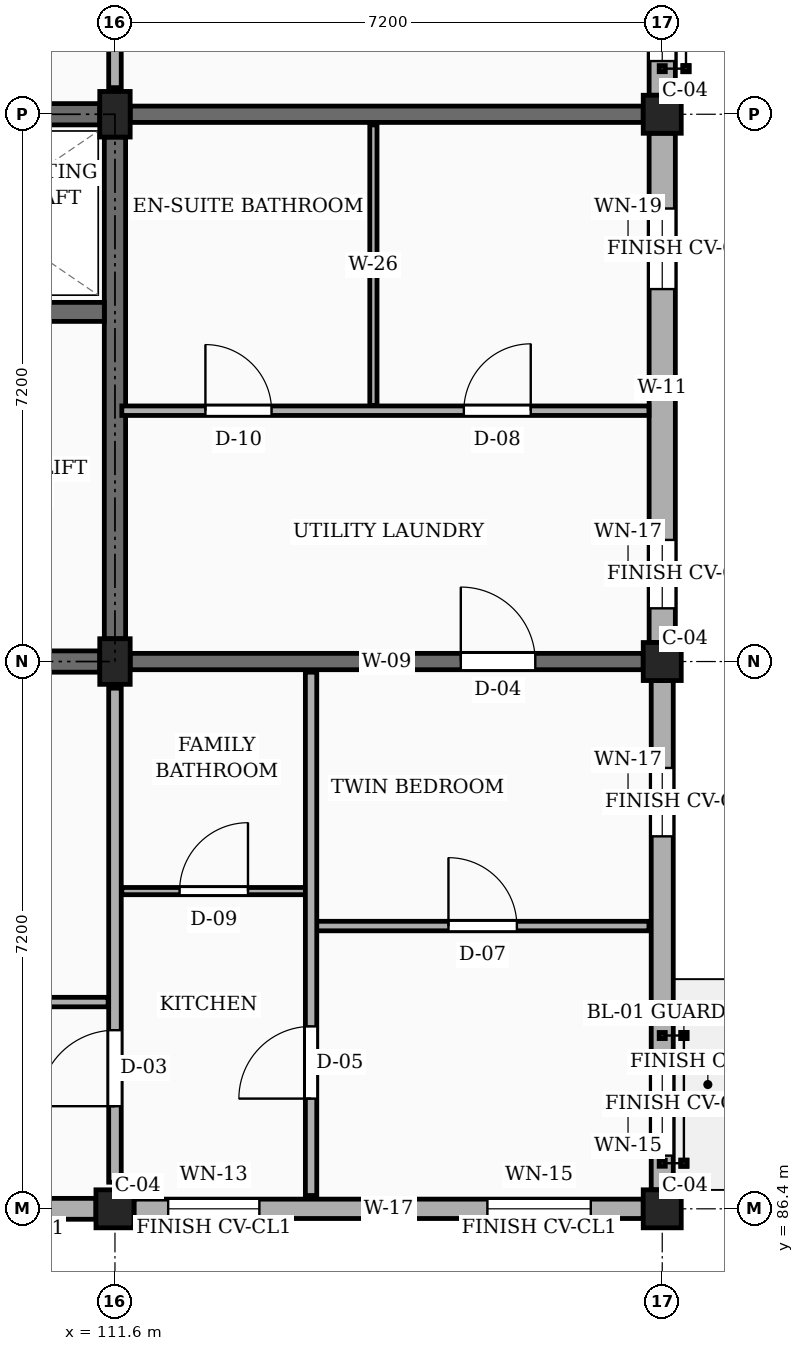
"""IFC4 building model, lengths in metres.
Left out: names, types, materials, properties, quantities, classifications, styles, units other than length and angle.
Written with IfcOpenShell. Run it as: python <this file> out.ifc"""

import sys

from ifc_helpers import new_model, si_unit, direction, frame, frame_2d, origin, origin_2d, place, context, subcontext, project, spatial, rectangle, extrude, element, fill, save


model = new_model("IFC4")
c1 = context("Model", 3, precision=1e-05, world=origin(), true_north=direction((0.0, 1.0)))
c2 = subcontext(c1, "Body", "Model", "MODEL_VIEW")
j1 = project(units=[si_unit("LENGTHUNIT", "METRE"), si_unit("PLANEANGLEUNIT", "RADIAN")], contexts=[c1])
p1 = place(None, origin())
s1 = spatial("IfcSite", under=j1, at=p1, CompositionType="ELEMENT")
p2 = place(p1, origin())
s2 = spatial("IfcBuilding", under=s1, at=p2, CompositionType="ELEMENT")
p3 = place(p2, frame((0.0, 0.0, 32.85)))
s3 = spatial("IfcBuildingStorey", under=s2, at=p3, CompositionType="ELEMENT", Elevation=32.85)
p4 = place(p3, frame((111.6, 86.4, 0.0), z_axis=(0.0, 0.0, 1.0), x_axis=(1.0, 0.0, 0.0)))
e1 = element("IfcColumn", 1, at=p4, inside=s3, PredefinedType="COLUMN", context=c2, shape_type="SweptSolid", body=[
    extrude(rectangle(XDim=0.5, YDim=0.5, at=origin_2d()), origin(), (0.0, 0.0, 1.0), 3.15),
])
for number, where, z_axis, x_axis in (
    (2, (111.6, 93.6, 0.0), (0.0, 0.0, 1.0), (1.0, 0.0, 0.0)),
    (3, (111.6, 100.8, 0.0), (0.0, 0.0, 1.0), (1.0, 0.0, 0.0)),
):
    element("IfcColumn", number, at=place(p3, frame(where, z_axis=z_axis, x_axis=x_axis)), inside=s3, PredefinedType="COLUMN", context=c2, shape_type="SweptSolid", body=[
        extrude(rectangle(XDim=0.4, YDim=0.6, at=origin_2d()), origin(), (0.0, 0.0, 1.0), 3.15),
    ])
for number, where, z_axis, x_axis in (
    (4, (118.8, 86.4, 0.0), (0.0, 0.0, 1.0), (1.0, 0.0, 0.0)),
    (5, (118.8, 93.6, 0.0), (0.0, 0.0, 1.0), (1.0, 0.0, 0.0)),
    (6, (118.8, 100.8, 0.0), (0.0, 0.0, 1.0), (1.0, 0.0, 0.0)),
):
    element("IfcColumn", number, at=place(p3, frame(where, z_axis=z_axis, x_axis=x_axis)), inside=s3, PredefinedType="COLUMN", context=c2, shape_type="SweptSolid", body=[
        extrude(rectangle(XDim=0.5, YDim=0.5, at=origin_2d()), origin(), (0.0, 0.0, 1.0), 3.15),
    ])
p5 = place(p3, frame((111.8, 93.6, 0.0), z_axis=(0.0, 0.0, 1.0), x_axis=(1.0, 0.0, 0.0)))
e7 = element("IfcWall", 7, at=p5, inside=s3, PredefinedType="SOLIDWALL", context=c2, shape_type="SweptSolid", body=[
    extrude(rectangle(XDim=6.75, YDim=0.215, at=frame_2d((3.375, 0.0))), origin(), (0.0, 0.0, 1.0), 2.22),
])
p6 = place(p5, frame((4.35, 0.0, 0.0)))
e8 = element("IfcOpeningElement", 8, at=p6, cuts=e7, PredefinedType="OPENING", context=c2, shape_type="SweptSolid", body=[
    extrude(rectangle(XDim=0.98, YDim=2.12, at=frame_2d((0.49, 1.06))), frame((0.0, 0.118, 0.0), z_axis=(0.0, -1.0, 0.0), x_axis=(1.0, 0.0, 0.0)), (0.0, 0.0, 1.0), 0.235),
])
p7 = place(p3, frame((111.8, 100.8, 0.0), z_axis=(0.0, 0.0, 1.0), x_axis=(1.0, 0.0, 0.0)))
e9 = element("IfcWall", 9, at=p7, inside=s3, PredefinedType="SOLIDWALL", context=c2, shape_type="SweptSolid", body=[
    extrude(rectangle(XDim=6.75, YDim=0.215, at=frame_2d((3.375, 0.0))), origin(), (0.0, 0.0, 1.0), 2.22),
])
p8 = place(p3, frame((104.65, 86.4, 0.0), z_axis=(0.0, 0.0, 1.0), x_axis=(1.0, 0.0, 0.0)))
e10 = element("IfcWall", 10, at=p8, inside=s3, PredefinedType="SOLIDWALL", context=c2, shape_type="SweptSolid", body=[
    extrude(rectangle(XDim=6.7, YDim=0.275, at=frame_2d((3.35, 0.0))), origin(), (0.0, 0.0, 1.0), 2.46),
])
p9 = place(p8, frame((0.45, 0.0, 0.78)))
e11 = element("IfcOpeningElement", 11, at=p9, cuts=e10, PredefinedType="OPENING", context=c2, shape_type="SweptSolid", body=[
    extrude(rectangle(XDim=1.04, YDim=1.26, at=frame_2d((0.52, 0.63))), frame((0.0, 0.147, 0.0), z_axis=(0.0, -1.0, 0.0), x_axis=(1.0, 0.0, 0.0)), (0.0, 0.0, 1.0), 0.295),
])
p10 = place(p8, frame((4.65, 0.0, 0.78)))
e12 = element("IfcOpeningElement", 12, at=p10, cuts=e10, PredefinedType="OPENING", context=c2, shape_type="SweptSolid", body=[
    extrude(rectangle(XDim=1.2, YDim=1.26, at=frame_2d((0.6, 0.63))), frame((0.0, 0.147, 0.0), z_axis=(0.0, -1.0, 0.0), x_axis=(1.0, 0.0, 0.0)), (0.0, 0.0, 1.0), 0.295),
])
p11 = place(p3, frame((111.85, 86.4, 0.0), z_axis=(0.0, 0.0, 1.0), x_axis=(1.0, 0.0, 0.0)))
e13 = element("IfcWall", 13, at=p11, inside=s3, PredefinedType="SOLIDWALL", context=c2, shape_type="SweptSolid", body=[
    extrude(rectangle(XDim=6.7, YDim=0.255, at=frame_2d((3.35, 0.0))), origin(), (0.0, 0.0, 1.0), 2.46),
])
p12 = place(p11, frame((0.45, 0.0, 0.78)))
e14 = element("IfcOpeningElement", 14, at=p12, cuts=e13, PredefinedType="OPENING", context=c2, shape_type="SweptSolid", body=[
    extrude(rectangle(XDim=1.2, YDim=1.26, at=frame_2d((0.6, 0.63))), frame((0.0, 0.137, 0.0), z_axis=(0.0, -1.0, 0.0), x_axis=(1.0, 0.0, 0.0)), (0.0, 0.0, 1.0), 0.275),
])
p13 = place(p11, frame((4.65, 0.0, 0.78)))
e15 = element("IfcOpeningElement", 15, at=p13, cuts=e13, PredefinedType="OPENING", context=c2, shape_type="SweptSolid", body=[
    extrude(rectangle(XDim=1.36, YDim=1.26, at=frame_2d((0.68, 0.63))), frame((0.0, 0.137, 0.0), z_axis=(0.0, -1.0, 0.0), x_axis=(1.0, 0.0, 0.0)), (0.0, 0.0, 1.0), 0.275),
])
p14 = place(p3, frame((118.8, 86.65, 0.0), z_axis=(0.0, 0.0, 1.0), x_axis=(0.0, 1.0, 0.0)))
e16 = element("IfcWall", 16, at=p14, inside=s3, PredefinedType="SOLIDWALL", context=c2, shape_type="SweptSolid", body=[
    extrude(rectangle(XDim=6.7, YDim=0.29, at=frame_2d((3.35, 0.0))), origin(), (0.0, 0.0, 1.0), 2.46),
])
p15 = place(p14, frame((0.45, 0.0, 0.78)))
e17 = element("IfcOpeningElement", 17, at=p15, cuts=e16, PredefinedType="OPENING", context=c2, shape_type="SweptSolid", body=[
    extrude(rectangle(XDim=1.36, YDim=1.26, at=frame_2d((0.68, 0.63))), frame((0.0, 0.155, 0.0), z_axis=(0.0, -1.0, 0.0), x_axis=(1.0, 0.0, 0.0)), (0.0, 0.0, 1.0), 0.31),
])
p16 = place(p14, frame((4.65, 0.0, 0.78)))
e18 = element("IfcOpeningElement", 18, at=p16, cuts=e16, PredefinedType="OPENING", context=c2, shape_type="SweptSolid", body=[
    extrude(rectangle(XDim=0.9, YDim=1.36, at=frame_2d((0.45, 0.68))), frame((0.0, 0.155, 0.0), z_axis=(0.0, -1.0, 0.0), x_axis=(1.0, 0.0, 0.0)), (0.0, 0.0, 1.0), 0.31),
])
p17 = place(p3, frame((118.8, 93.85, 0.0), z_axis=(0.0, 0.0, 1.0), x_axis=(0.0, 1.0, 0.0)))
e19 = element("IfcWall", 19, at=p17, inside=s3, PredefinedType="SOLIDWALL", context=c2, shape_type="SweptSolid", body=[
    extrude(rectangle(XDim=6.7, YDim=0.345, at=frame_2d((3.35, 0.0))), origin(), (0.0, 0.0, 1.0), 2.46),
])
p18 = place(p17, frame((0.45, 0.0, 0.78)))
e20 = element("IfcOpeningElement", 20, at=p18, cuts=e19, PredefinedType="OPENING", context=c2, shape_type="SweptSolid", body=[
    extrude(rectangle(XDim=0.9, YDim=1.36, at=frame_2d((0.45, 0.68))), frame((0.0, 0.183, 0.0), z_axis=(0.0, -1.0, 0.0), x_axis=(1.0, 0.0, 0.0)), (0.0, 0.0, 1.0), 0.365),
])
p19 = place(p17, frame((4.65, 0.0, 0.78)))
e21 = element("IfcOpeningElement", 21, at=p19, cuts=e19, PredefinedType="OPENING", context=c2, shape_type="SweptSolid", body=[
    extrude(rectangle(XDim=1.06, YDim=1.36, at=frame_2d((0.53, 0.68))), frame((0.0, 0.183, 0.0), z_axis=(0.0, -1.0, 0.0), x_axis=(1.0, 0.0, 0.0)), (0.0, 0.0, 1.0), 0.365),
])
p20 = place(p3, frame((118.8, 101.05, 0.0), z_axis=(0.0, 0.0, 1.0), x_axis=(0.0, 1.0, 0.0)))
e22 = element("IfcWall", 22, at=p20, inside=s3, PredefinedType="SOLIDWALL", context=c2, shape_type="SweptSolid", body=[
    extrude(rectangle(XDim=6.7, YDim=0.345, at=frame_2d((3.35, 0.0))), origin(), (0.0, 0.0, 1.0), 2.46),
])
p21 = place(p20, frame((0.45, 0.0, 0.78)))
e23 = element("IfcOpeningElement", 23, at=p21, cuts=e22, PredefinedType="OPENING", context=c2, shape_type="SweptSolid", body=[
    extrude(rectangle(XDim=1.06, YDim=1.36, at=frame_2d((0.53, 0.68))), frame((0.0, 0.183, 0.0), z_axis=(0.0, -1.0, 0.0), x_axis=(1.0, 0.0, 0.0)), (0.0, 0.0, 1.0), 0.365),
])
p22 = place(p20, frame((4.65, 0.0, 0.78)))
e24 = element("IfcOpeningElement", 24, at=p22, cuts=e22, PredefinedType="OPENING", context=c2, shape_type="SweptSolid", body=[
    extrude(rectangle(XDim=1.22, YDim=1.36, at=frame_2d((0.61, 0.68))), frame((0.0, 0.183, 0.0), z_axis=(0.0, -1.0, 0.0), x_axis=(1.0, 0.0, 0.0)), (0.0, 0.0, 1.0), 0.365),
])
p23 = place(p3, frame((104.6, 100.8, 0.0), z_axis=(0.0, 0.0, 1.0), x_axis=(1.0, 0.0, 0.0)))
e25 = element("IfcWall", 25, at=p23, inside=s3, PredefinedType="SHEAR", context=c2, shape_type="SweptSolid", body=[
    extrude(rectangle(XDim=6.8, YDim=0.28, at=frame_2d((3.4, 0.0))), origin(), (0.0, 0.0, 1.0), 2.89),
])
p24 = place(p3, frame((111.6, 93.9, 0.0), z_axis=(0.0, 0.0, 1.0), x_axis=(0.0, 1.0, 0.0)))
e26 = element("IfcWall", 26, at=p24, inside=s3, PredefinedType="SHEAR", context=c2, shape_type="SweptSolid", body=[
    extrude(rectangle(XDim=6.6, YDim=0.28, at=frame_2d((3.3, 0.0))), origin(), (0.0, 0.0, 1.0), 2.89),
])
p25 = place(p3, frame((104.6, 93.6, 0.0), z_axis=(0.0, 0.0, 1.0), x_axis=(1.0, 0.0, 0.0)))
e27 = element("IfcWall", 27, at=p25, inside=s3, PredefinedType="SHEAR", context=c2, shape_type="SweptSolid", body=[
    extrude(rectangle(XDim=6.8, YDim=0.28, at=frame_2d((3.4, 0.0))), origin(), (0.0, 0.0, 1.0), 2.89),
])
p26 = place(p25, frame((4.55, 0.0, 0.0)))
e28 = element("IfcOpeningElement", 28, at=p26, cuts=e27, PredefinedType="OPENING", context=c2, shape_type="SweptSolid", body=[
    extrude(rectangle(XDim=1.1, YDim=2.15, at=frame_2d((0.55, 1.075))), frame((0.0, 0.15, 0.0), z_axis=(0.0, -1.0, 0.0), x_axis=(1.0, 0.0, 0.0)), (0.0, 0.0, 1.0), 0.3),
])
p27 = place(p3, frame((108.125, 98.2, 0.0), z_axis=(0.0, 0.0, 1.0), x_axis=(1.0, 0.0, 0.0)))
e29 = element("IfcWall", 29, at=p27, inside=s3, PredefinedType="SHEAR", context=c2, shape_type="SweptSolid", body=[
    extrude(rectangle(XDim=3.335, YDim=0.25, at=frame_2d((1.667, 0.0))), origin(), (0.0, 0.0, 1.0), 2.89),
])
p28 = place(p27, frame((1.1, 0.0, 0.0)))
e30 = element("IfcOpeningElement", 30, at=p28, cuts=e29, PredefinedType="OPENING", context=c2, shape_type="SweptSolid", body=[
    extrude(rectangle(XDim=1.1, YDim=2.2, at=frame_2d((0.55, 1.1))), frame((0.0, 0.135, 0.0), z_axis=(0.0, -1.0, 0.0), x_axis=(1.0, 0.0, 0.0)), (0.0, 0.0, 1.0), 0.27),
])
p29 = place(p3, frame((111.6, 86.75, 0.0), z_axis=(0.0, 0.0, 1.0), x_axis=(0.0, 1.0, 0.0)))
e31 = element("IfcWall", 31, at=p29, inside=s3, PredefinedType="PARTITIONING", context=c2, shape_type="SweptSolid", body=[
    extrude(rectangle(XDim=6.5, YDim=0.165, at=frame_2d((3.25, 0.0))), origin(), (0.0, 0.0, 1.0), 2.325),
])
p30 = place(p29, frame((1.0, 0.0, 0.0)))
e32 = element("IfcOpeningElement", 32, at=p30, cuts=e31, PredefinedType="OPENING", context=c2, shape_type="SweptSolid", body=[
    extrude(rectangle(XDim=1.0, YDim=2.15, at=frame_2d((0.5, 1.075))), frame((0.0, 0.093, 0.0), z_axis=(0.0, -1.0, 0.0), x_axis=(1.0, 0.0, 0.0)), (0.0, 0.0, 1.0), 0.185),
])
p31 = place(p3, frame((111.6, 101.15, 0.0), z_axis=(0.0, 0.0, 1.0), x_axis=(0.0, 1.0, 0.0)))
e33 = element("IfcWall", 33, at=p31, inside=s3, PredefinedType="PARTITIONING", context=c2, shape_type="SweptSolid", body=[
    extrude(rectangle(XDim=6.5, YDim=0.165, at=frame_2d((3.25, 0.0))), origin(), (0.0, 0.0, 1.0), 2.325),
])
p32 = place(p31, frame((1.1, 0.0, 0.0)))
e34 = element("IfcOpeningElement", 34, at=p32, cuts=e33, PredefinedType="OPENING", context=c2, shape_type="SweptSolid", body=[
    extrude(rectangle(XDim=0.94, YDim=2.12, at=frame_2d((0.47, 1.06))), frame((0.0, 0.093, 0.0), z_axis=(0.0, -1.0, 0.0), x_axis=(1.0, 0.0, 0.0)), (0.0, 0.0, 1.0), 0.185),
])
p33 = place(p3, frame((104.49, 89.12, 0.0), z_axis=(0.0, 0.0, 1.0), x_axis=(1.0, 0.0, 0.0)))
e35 = element("IfcWall", 35, at=p33, inside=s3, PredefinedType="PARTITIONING", context=c2, shape_type="SweptSolid", body=[
    extrude(rectangle(XDim=7.02, YDim=0.125, at=frame_2d((3.51, 0.0))), origin(), (0.0, 0.0, 1.0), 2.325),
])
p34 = place(p33, frame((2.85, 0.0, 0.0)))
e36 = element("IfcOpeningElement", 36, at=p34, cuts=e35, PredefinedType="OPENING", context=c2, shape_type="SweptSolid", body=[
    extrude(rectangle(XDim=1.02, YDim=2.15, at=frame_2d((0.51, 1.075))), frame((0.0, 0.073, 0.0), z_axis=(0.0, -1.0, 0.0), x_axis=(1.0, 0.0, 0.0)), (0.0, 0.0, 1.0), 0.145),
])
p35 = place(p3, frame((114.25, 90.12, 0.0), z_axis=(0.0, 0.0, 1.0), x_axis=(1.0, 0.0, 0.0)))
e37 = element("IfcWall", 37, at=p35, inside=s3, PredefinedType="PARTITIONING", context=c2, shape_type="SweptSolid", body=[
    extrude(rectangle(XDim=4.375, YDim=0.125, at=frame_2d((2.188, 0.0))), origin(), (0.0, 0.0, 1.0), 2.325),
])
p36 = place(p35, frame((1.738, 0.0, 0.0)))
e38 = element("IfcOpeningElement", 38, at=p36, cuts=e37, PredefinedType="OPENING", context=c2, shape_type="SweptSolid", body=[
    extrude(rectangle(XDim=0.9, YDim=2.1, at=frame_2d((0.45, 1.05))), frame((0.0, 0.073, 0.0), z_axis=(0.0, -1.0, 0.0), x_axis=(1.0, 0.0, 0.0)), (0.0, 0.0, 1.0), 0.145),
])
p37 = place(p3, frame((111.69, 90.58, 0.0), z_axis=(0.0, 0.0, 1.0), x_axis=(1.0, 0.0, 0.0)))
e39 = element("IfcWall", 39, at=p37, inside=s3, PredefinedType="PARTITIONING", context=c2, shape_type="SweptSolid", body=[
    extrude(rectangle(XDim=2.42, YDim=0.095, at=frame_2d((1.21, 0.0))), origin(), (0.0, 0.0, 1.0), 2.325),
])
p38 = place(p37, frame((0.76, 0.0, 0.0)))
e40 = element("IfcOpeningElement", 40, at=p38, cuts=e39, PredefinedType="OPENING", context=c2, shape_type="SweptSolid", body=[
    extrude(rectangle(XDim=0.9, YDim=2.05, at=frame_2d((0.45, 1.025))), frame((0.0, 0.058, 0.0), z_axis=(0.0, -1.0, 0.0), x_axis=(1.0, 0.0, 0.0)), (0.0, 0.0, 1.0), 0.115),
])
p39 = place(p3, frame((114.18, 86.575, 0.0), z_axis=(0.0, 0.0, 1.0), x_axis=(0.0, 1.0, 0.0)))
e41 = element("IfcWall", 41, at=p39, inside=s3, PredefinedType="PARTITIONING", context=c2, shape_type="SweptSolid", body=[
    extrude(rectangle(XDim=6.885, YDim=0.15, at=frame_2d((3.442, 0.0))), origin(), (0.0, 0.0, 1.0), 2.325),
])
p40 = place(p39, frame((1.275, 0.0, 0.0)))
e42 = element("IfcOpeningElement", 42, at=p40, cuts=e41, PredefinedType="OPENING", context=c2, shape_type="SweptSolid", body=[
    extrude(rectangle(XDim=0.95, YDim=2.1, at=frame_2d((0.475, 1.05))), frame((0.0, 0.085, 0.0), z_axis=(0.0, -1.0, 0.0), x_axis=(1.0, 0.0, 0.0)), (0.0, 0.0, 1.0), 0.17),
])
p41 = place(p3, frame((111.69, 96.9, 0.0), z_axis=(0.0, 0.0, 1.0), x_axis=(1.0, 0.0, 0.0)))
e43 = element("IfcWall", 43, at=p41, inside=s3, PredefinedType="PARTITIONING", context=c2, shape_type="SweptSolid", body=[
    extrude(rectangle(XDim=6.935, YDim=0.125, at=frame_2d((3.468, 0.0))), origin(), (0.0, 0.0, 1.0), 2.325),
])
p42 = place(p41, frame((1.1, 0.0, 0.0)))
e44 = element("IfcOpeningElement", 44, at=p42, cuts=e43, PredefinedType="OPENING", context=c2, shape_type="SweptSolid", body=[
    extrude(rectangle(XDim=0.87, YDim=2.05, at=frame_2d((0.435, 1.025))), frame((0.0, 0.073, 0.0), z_axis=(0.0, -1.0, 0.0), x_axis=(1.0, 0.0, 0.0)), (0.0, 0.0, 1.0), 0.145),
])
p43 = place(p41, frame((4.5, 0.0, 0.0)))
e45 = element("IfcOpeningElement", 45, at=p43, cuts=e43, PredefinedType="OPENING", context=c2, shape_type="SweptSolid", body=[
    extrude(rectangle(XDim=0.88, YDim=2.08, at=frame_2d((0.44, 1.04))), frame((0.0, 0.073, 0.0), z_axis=(0.0, -1.0, 0.0), x_axis=(1.0, 0.0, 0.0)), (0.0, 0.0, 1.0), 0.145),
])
p44 = place(p3, frame((115.0, 96.97, 0.0), z_axis=(0.0, 0.0, 1.0), x_axis=(0.0, 1.0, 0.0)))
e46 = element("IfcWall", 46, at=p44, inside=s3, PredefinedType="PARTITIONING", context=c2, shape_type="SweptSolid", body=[
    extrude(rectangle(XDim=3.69, YDim=0.095, at=frame_2d((1.845, 0.0))), origin(), (0.0, 0.0, 1.0), 2.325),
])
p45 = place(p12, origin())
e47 = element("IfcWindow", 47, at=p45, inside=s3, PartitioningType="SINGLE_PANEL", PredefinedType="WINDOW", context=c2, shape_type="SweptSolid", body=[
    extrude(rectangle(XDim=1.2, YDim=1.26, at=frame_2d((0.6, 0.63))), frame((0.0, 0.03, 0.0), z_axis=(0.0, -1.0, 0.0), x_axis=(1.0, 0.0, 0.0)), (0.0, 0.0, 1.0), 0.06),
])
fill(e14, e47)
p46 = place(p13, origin())
e48 = element("IfcWindow", 48, at=p46, inside=s3, PartitioningType="SINGLE_PANEL", PredefinedType="WINDOW", context=c2, shape_type="SweptSolid", body=[
    extrude(rectangle(XDim=1.36, YDim=1.26, at=frame_2d((0.68, 0.63))), frame((0.0, 0.03, 0.0), z_axis=(0.0, -1.0, 0.0), x_axis=(1.0, 0.0, 0.0)), (0.0, 0.0, 1.0), 0.06),
])
fill(e15, e48)
p47 = place(p15, origin())
e49 = element("IfcWindow", 49, at=p47, inside=s3, PartitioningType="SINGLE_PANEL", PredefinedType="WINDOW", context=c2, shape_type="SweptSolid", body=[
    extrude(rectangle(XDim=1.36, YDim=1.26, at=frame_2d((0.68, 0.63))), frame((0.0, 0.03, 0.0), z_axis=(0.0, -1.0, 0.0), x_axis=(1.0, 0.0, 0.0)), (0.0, 0.0, 1.0), 0.06),
])
fill(e17, e49)
p48 = place(p16, origin())
e50 = element("IfcWindow", 50, at=p48, inside=s3, PartitioningType="SINGLE_PANEL", PredefinedType="WINDOW", context=c2, shape_type="SweptSolid", body=[
    extrude(rectangle(XDim=0.9, YDim=1.36, at=frame_2d((0.45, 0.68))), frame((0.0, 0.03, 0.0), z_axis=(0.0, -1.0, 0.0), x_axis=(1.0, 0.0, 0.0)), (0.0, 0.0, 1.0), 0.06),
])
fill(e18, e50)
p49 = place(p18, origin())
e51 = element("IfcWindow", 51, at=p49, inside=s3, PartitioningType="SINGLE_PANEL", PredefinedType="WINDOW", context=c2, shape_type="SweptSolid", body=[
    extrude(rectangle(XDim=0.9, YDim=1.36, at=frame_2d((0.45, 0.68))), frame((0.0, 0.03, 0.0), z_axis=(0.0, -1.0, 0.0), x_axis=(1.0, 0.0, 0.0)), (0.0, 0.0, 1.0), 0.06),
])
fill(e20, e51)
p50 = place(p19, origin())
e52 = element("IfcWindow", 52, at=p50, inside=s3, PartitioningType="SINGLE_PANEL", PredefinedType="WINDOW", context=c2, shape_type="SweptSolid", body=[
    extrude(rectangle(XDim=1.06, YDim=1.36, at=frame_2d((0.53, 0.68))), frame((0.0, 0.03, 0.0), z_axis=(0.0, -1.0, 0.0), x_axis=(1.0, 0.0, 0.0)), (0.0, 0.0, 1.0), 0.06),
])
fill(e21, e52)
p51 = place(p21, origin())
e53 = element("IfcWindow", 53, at=p51, inside=s3, PartitioningType="SINGLE_PANEL", PredefinedType="WINDOW", context=c2, shape_type="SweptSolid", body=[
    extrude(rectangle(XDim=1.06, YDim=1.36, at=frame_2d((0.53, 0.68))), frame((0.0, 0.03, 0.0), z_axis=(0.0, -1.0, 0.0), x_axis=(1.0, 0.0, 0.0)), (0.0, 0.0, 1.0), 0.06),
])
fill(e23, e53)
p52 = place(p30, origin())
e54 = element("IfcDoor", 54, at=p52, inside=s3, OperationType="SINGLE_SWING_LEFT", PredefinedType="DOOR", context=c2, shape_type="SweptSolid", body=[
    extrude(rectangle(XDim=1.0, YDim=2.15, at=frame_2d((0.5, 1.075))), frame((0.0, 0.025, 0.0), z_axis=(0.0, -1.0, 0.0), x_axis=(1.0, 0.0, 0.0)), (0.0, 0.0, 1.0), 0.05),
])
fill(e32, e54)
p53 = place(p36, origin())
e55 = element("IfcDoor", 55, at=p53, inside=s3, OperationType="SINGLE_SWING_LEFT", PredefinedType="DOOR", context=c2, shape_type="SweptSolid", body=[
    extrude(rectangle(XDim=0.9, YDim=2.1, at=frame_2d((0.45, 1.05))), frame((0.0, 0.025, 0.0), z_axis=(0.0, -1.0, 0.0), x_axis=(1.0, 0.0, 0.0)), (0.0, 0.0, 1.0), 0.05),
])
fill(e38, e55)
p54 = place(p38, origin())
e56 = element("IfcDoor", 56, at=p54, inside=s3, OperationType="SINGLE_SWING_RIGHT", PredefinedType="DOOR", context=c2, shape_type="SweptSolid", body=[
    extrude(rectangle(XDim=0.9, YDim=2.05, at=frame_2d((0.45, 1.025))), frame((0.0, 0.025, 0.0), z_axis=(0.0, -1.0, 0.0), x_axis=(1.0, 0.0, 0.0)), (0.0, 0.0, 1.0), 0.05),
])
fill(e40, e56)
p55 = place(p40, origin())
e57 = element("IfcDoor", 57, at=p55, inside=s3, OperationType="SINGLE_SWING_LEFT", PredefinedType="DOOR", context=c2, shape_type="SweptSolid", body=[
    extrude(rectangle(XDim=0.95, YDim=2.1, at=frame_2d((0.475, 1.05))), frame((0.0, 0.025, 0.0), z_axis=(0.0, -1.0, 0.0), x_axis=(1.0, 0.0, 0.0)), (0.0, 0.0, 1.0), 0.05),
])
fill(e42, e57)
p56 = place(p42, origin())
e58 = element("IfcDoor", 58, at=p56, inside=s3, OperationType="SINGLE_SWING_LEFT", PredefinedType="DOOR", context=c2, shape_type="SweptSolid", body=[
    extrude(rectangle(XDim=0.87, YDim=2.05, at=frame_2d((0.435, 1.025))), frame((0.0, 0.025, 0.0), z_axis=(0.0, -1.0, 0.0), x_axis=(1.0, 0.0, 0.0)), (0.0, 0.0, 1.0), 0.05),
])
fill(e44, e58)
p57 = place(p43, origin())
e59 = element("IfcDoor", 59, at=p57, inside=s3, OperationType="SINGLE_SWING_RIGHT", PredefinedType="DOOR", context=c2, shape_type="SweptSolid", body=[
    extrude(rectangle(XDim=0.88, YDim=2.08, at=frame_2d((0.44, 1.04))), frame((0.0, 0.025, 0.0), z_axis=(0.0, -1.0, 0.0), x_axis=(1.0, 0.0, 0.0)), (0.0, 0.0, 1.0), 0.05),
])
fill(e45, e59)
p58 = place(p6, origin())
e60 = element("IfcDoor", 60, at=p58, inside=s3, OperationType="SINGLE_SWING_LEFT", PredefinedType="DOOR", context=c2, shape_type="SweptSolid", body=[
    extrude(rectangle(XDim=0.98, YDim=2.12, at=frame_2d((0.49, 1.06))), frame((0.0, 0.025, 0.0), z_axis=(0.0, -1.0, 0.0), x_axis=(1.0, 0.0, 0.0)), (0.0, 0.0, 1.0), 0.05),
])
fill(e8, e60)
save(model, sys.argv[1])
